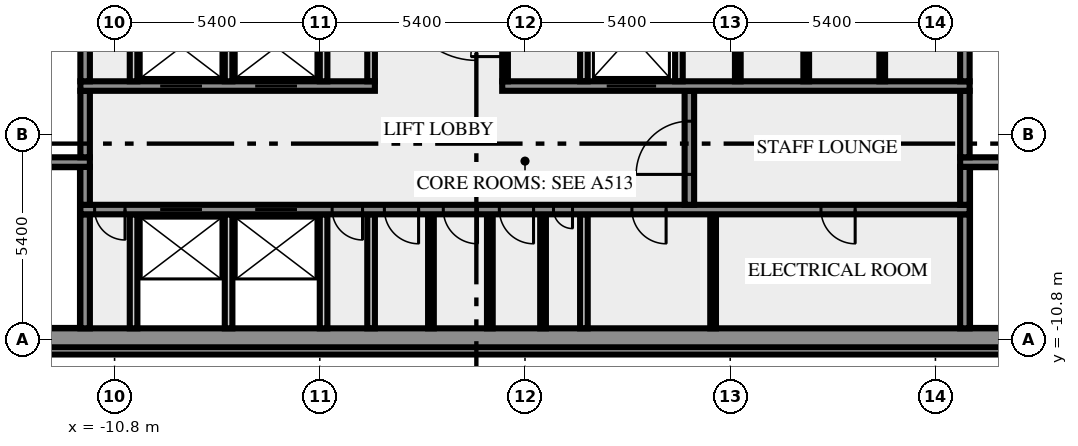
"""IFC4 building model, lengths in metres.
Left out: names, types, materials, properties, quantities, classifications, styles, units other than length and angle.
Written with IfcOpenShell. Run it as: python <this file> out.ifc"""

import sys

from ifc_helpers import new_model, si_unit, direction, frame, frame_2d, origin, place, context, subcontext, project, spatial, rectangle, extrude, element, fill, save


model = new_model("IFC4")
c1 = context("Model", 3, precision=1e-05, world=origin(), true_north=direction((0.0, 1.0)))
c2 = subcontext(c1, "Body", "Model", "MODEL_VIEW")
j1 = project(units=[si_unit("LENGTHUNIT", "METRE"), si_unit("PLANEANGLEUNIT", "RADIAN")], contexts=[c1])
p1 = place(None, origin())
s1 = spatial("IfcSite", under=j1, at=p1, CompositionType="ELEMENT")
p2 = place(p1, origin())
s2 = spatial("IfcBuilding", under=s1, at=p2, CompositionType="ELEMENT")
p3 = place(p2, frame((0.0, 0.0, 289.0)))
s3 = spatial("IfcBuildingStorey", under=s2, at=p3, CompositionType="ELEMENT", Elevation=289.0)
p4 = place(p3, frame((-17.444, -11.088, 0.0), z_axis=(0.0, 0.0, 1.0), x_axis=(1.0, 0.0, 0.0)))
e1 = element("IfcWall", 1, at=p4, inside=s3, PredefinedType="SOLIDWALL", context=c2, shape_type="SweptSolid", body=[
    extrude(rectangle(XDim=34.888, YDim=0.2, at=frame_2d((17.444, 0.0))), origin(), (0.0, 0.0, 1.0), 3.65),
])
p5 = place(p3, frame((-20.0, -10.75, 0.0), z_axis=(0.0, 0.0, 1.0), x_axis=(1.0, 0.0, 0.0)))
e2 = element("IfcWall", 2, at=p5, inside=s3, PredefinedType="SHEAR", context=c2, shape_type="SweptSolid", body=[
    extrude(rectangle(XDim=40.0, YDim=0.5, at=frame_2d((20.0, 0.0))), origin(), (0.0, 0.0, 1.0), 3.65),
])
p6 = place(p5, frame((0.8, 0.0, 1.0)))
e3 = element("IfcOpeningElement", 3, at=p6, cuts=e2, PredefinedType="OPENING", context=c2, shape_type="SweptSolid", body=[
    extrude(rectangle(XDim=1.2, YDim=1.2, at=frame_2d((0.6, 0.6))), frame((0.0, 0.26, 0.0), z_axis=(0.0, -1.0, 0.0), x_axis=(1.0, 0.0, 0.0)), (0.0, 0.0, 1.0), 0.52),
])
p7 = place(p5, frame((38.0, 0.0, 1.0)))
e4 = element("IfcOpeningElement", 4, at=p7, cuts=e2, PredefinedType="OPENING", context=c2, shape_type="SweptSolid", body=[
    extrude(rectangle(XDim=1.2, YDim=1.2, at=frame_2d((0.6, 0.6))), frame((0.0, 0.26, 0.0), z_axis=(0.0, -1.0, 0.0), x_axis=(1.0, 0.0, 0.0)), (0.0, 0.0, 1.0), 0.52),
])
p8 = place(p3, frame((-11.575, -10.5, 0.0), z_axis=(0.0, 0.0, 1.0), x_axis=(0.0, 1.0, 0.0)))
e5 = element("IfcWall", 5, at=p8, inside=s3, PredefinedType="SHEAR", context=c2, shape_type="SweptSolid", body=[
    extrude(rectangle(XDim=3.0, YDim=0.25, at=frame_2d((1.5, 0.0))), origin(), (0.0, 0.0, 1.0), 3.65),
])
for number, where, z_axis, x_axis in (
    (6, (-10.3, -10.5, 0.0), (0.0, 0.0, 1.0), (0.0, 1.0, 0.0)),
    (7, (-7.8, -10.5, 0.0), (0.0, 0.0, 1.0), (0.0, 1.0, 0.0)),
    (8, (-5.3, -10.5, 0.0), (0.0, 0.0, 1.0), (0.0, 1.0, 0.0)),
    (9, (-4.05, -10.5, 0.0), (0.0, 0.0, 1.0), (0.0, 1.0, 0.0)),
):
    element("IfcWall", number, at=place(p3, frame(where, z_axis=z_axis, x_axis=x_axis)), inside=s3, PredefinedType="SOLIDWALL", context=c2, shape_type="SweptSolid", body=[
        extrude(rectangle(XDim=3.0, YDim=0.2, at=frame_2d((1.5, 0.0))), origin(), (0.0, 0.0, 1.0), 3.65),
    ])
for number, where, z_axis, x_axis in (
    (10, (-2.475, -10.5, 0.0), (0.0, 0.0, 1.0), (0.0, 1.0, 0.0)),
    (11, (-0.925, -10.5, 0.0), (0.0, 0.0, 1.0), (0.0, 1.0, 0.0)),
    (12, (0.475, -10.5, 0.0), (0.0, 0.0, 1.0), (0.0, 1.0, 0.0)),
):
    element("IfcWall", number, at=place(p3, frame(where, z_axis=z_axis, x_axis=x_axis)), inside=s3, PredefinedType="PARTITIONING", context=c2, shape_type="SweptSolid", body=[
        extrude(rectangle(XDim=3.0, YDim=0.15, at=frame_2d((1.5, 0.0))), origin(), (0.0, 0.0, 1.0), 3.65),
    ])
p9 = place(p3, frame((1.55, -10.5, 0.0), z_axis=(0.0, 0.0, 1.0), x_axis=(0.0, 1.0, 0.0)))
e13 = element("IfcWall", 13, at=p9, inside=s3, PredefinedType="SOLIDWALL", context=c2, shape_type="SweptSolid", body=[
    extrude(rectangle(XDim=3.0, YDim=0.2, at=frame_2d((1.5, 0.0))), origin(), (0.0, 0.0, 1.0), 3.65),
])
p10 = place(p3, frame((4.95, -10.5, 0.0), z_axis=(0.0, 0.0, 1.0), x_axis=(0.0, 1.0, 0.0)))
e14 = element("IfcWall", 14, at=p10, inside=s3, PredefinedType="PARTITIONING", context=c2, shape_type="SweptSolid", body=[
    extrude(rectangle(XDim=3.0, YDim=0.15, at=frame_2d((1.5, 0.0))), origin(), (0.0, 0.0, 1.0), 3.65),
])
p11 = place(p3, frame((11.575, -10.5, 0.0), z_axis=(0.0, 0.0, 1.0), x_axis=(0.0, 1.0, 0.0)))
e15 = element("IfcWall", 15, at=p11, inside=s3, PredefinedType="SHEAR", context=c2, shape_type="SweptSolid", body=[
    extrude(rectangle(XDim=3.0, YDim=0.25, at=frame_2d((1.5, 0.0))), origin(), (0.0, 0.0, 1.0), 3.65),
])
p12 = place(p3, frame((11.7, -7.375, 0.0), z_axis=(0.0, 0.0, 1.0), x_axis=(-1.0, 0.0, 0.0)))
e16 = element("IfcWall", 16, at=p12, inside=s3, PredefinedType="SHEAR", context=c2, shape_type="SweptSolid", body=[
    extrude(rectangle(XDim=23.4, YDim=0.25, at=frame_2d((11.7, 0.0))), origin(), (0.0, 0.0, 1.0), 3.65),
])
p13 = place(p12, frame((22.225, 0.0, 0.0)))
e17 = element("IfcOpeningElement", 17, at=p13, cuts=e16, PredefinedType="OPENING", context=c2, shape_type="SweptSolid", body=[
    extrude(rectangle(XDim=0.8, YDim=2.1, at=frame_2d((0.4, 1.05))), frame((0.0, 0.135, 0.0), z_axis=(0.0, -1.0, 0.0), x_axis=(1.0, 0.0, 0.0)), (0.0, 0.0, 1.0), 0.27),
])
p14 = place(p12, frame((20.2, 0.0, 0.0)))
e18 = element("IfcOpeningElement", 18, at=p14, cuts=e16, PredefinedType="OPENING", context=c2, shape_type="SweptSolid", body=[
    extrude(rectangle(XDim=1.1, YDim=2.1, at=frame_2d((0.55, 1.05))), frame((0.0, 0.135, 0.0), z_axis=(0.0, -1.0, 0.0), x_axis=(1.0, 0.0, 0.0)), (0.0, 0.0, 1.0), 0.27),
])
p15 = place(p12, frame((17.7, 0.0, 0.0)))
e19 = element("IfcOpeningElement", 19, at=p15, cuts=e16, PredefinedType="OPENING", context=c2, shape_type="SweptSolid", body=[
    extrude(rectangle(XDim=1.1, YDim=2.1, at=frame_2d((0.55, 1.05))), frame((0.0, 0.135, 0.0), z_axis=(0.0, -1.0, 0.0), x_axis=(1.0, 0.0, 0.0)), (0.0, 0.0, 1.0), 0.27),
])
p16 = place(p12, frame((15.975, 0.0, 0.0)))
e20 = element("IfcOpeningElement", 20, at=p16, cuts=e16, PredefinedType="OPENING", context=c2, shape_type="SweptSolid", body=[
    extrude(rectangle(XDim=0.8, YDim=2.1, at=frame_2d((0.4, 1.05))), frame((0.0, 0.135, 0.0), z_axis=(0.0, -1.0, 0.0), x_axis=(1.0, 0.0, 0.0)), (0.0, 0.0, 1.0), 0.27),
])
p17 = place(p12, frame((14.5, 0.0, 0.0)))
e21 = element("IfcOpeningElement", 21, at=p17, cuts=e16, PredefinedType="OPENING", context=c2, shape_type="SweptSolid", body=[
    extrude(rectangle(XDim=0.9, YDim=2.1, at=frame_2d((0.45, 1.05))), frame((0.0, 0.135, 0.0), z_axis=(0.0, -1.0, 0.0), x_axis=(1.0, 0.0, 0.0)), (0.0, 0.0, 1.0), 0.27),
])
p18 = place(p12, frame((12.95, 0.0, 0.0)))
e22 = element("IfcOpeningElement", 22, at=p18, cuts=e16, PredefinedType="OPENING", context=c2, shape_type="SweptSolid", body=[
    extrude(rectangle(XDim=0.9, YDim=2.1, at=frame_2d((0.45, 1.05))), frame((0.0, 0.135, 0.0), z_axis=(0.0, -1.0, 0.0), x_axis=(1.0, 0.0, 0.0)), (0.0, 0.0, 1.0), 0.27),
])
p19 = place(p12, frame((11.475, 0.0, 0.0)))
e23 = element("IfcOpeningElement", 23, at=p19, cuts=e16, PredefinedType="OPENING", context=c2, shape_type="SweptSolid", body=[
    extrude(rectangle(XDim=0.9, YDim=2.1, at=frame_2d((0.45, 1.05))), frame((0.0, 0.135, 0.0), z_axis=(0.0, -1.0, 0.0), x_axis=(1.0, 0.0, 0.0)), (0.0, 0.0, 1.0), 0.27),
])
p20 = place(p12, frame((10.45, 0.0, 0.0)))
e24 = element("IfcOpeningElement", 24, at=p20, cuts=e16, PredefinedType="OPENING", context=c2, shape_type="SweptSolid", body=[
    extrude(rectangle(XDim=0.5, YDim=2.1, at=frame_2d((0.25, 1.05))), frame((0.0, 0.135, 0.0), z_axis=(0.0, -1.0, 0.0), x_axis=(1.0, 0.0, 0.0)), (0.0, 0.0, 1.0), 0.27),
])
p21 = place(p12, frame((7.987, 0.0, 0.0)))
e25 = element("IfcOpeningElement", 25, at=p21, cuts=e16, PredefinedType="OPENING", context=c2, shape_type="SweptSolid", body=[
    extrude(rectangle(XDim=0.9, YDim=2.1, at=frame_2d((0.45, 1.05))), frame((0.0, 0.135, 0.0), z_axis=(0.0, -1.0, 0.0), x_axis=(1.0, 0.0, 0.0)), (0.0, 0.0, 1.0), 0.27),
])
p22 = place(p12, frame((3.012, 0.0, 0.0)))
e26 = element("IfcOpeningElement", 26, at=p22, cuts=e16, PredefinedType="OPENING", context=c2, shape_type="SweptSolid", body=[
    extrude(rectangle(XDim=0.9, YDim=2.1, at=frame_2d((0.45, 1.05))), frame((0.0, 0.135, 0.0), z_axis=(0.0, -1.0, 0.0), x_axis=(1.0, 0.0, 0.0)), (0.0, 0.0, 1.0), 0.27),
])
p23 = place(p3, frame((-11.575, -7.25, 0.0), z_axis=(0.0, 0.0, 1.0), x_axis=(0.0, 1.0, 0.0)))
e27 = element("IfcWall", 27, at=p23, inside=s3, PredefinedType="SHEAR", context=c2, shape_type="SweptSolid", body=[
    extrude(rectangle(XDim=1.0, YDim=0.25, at=frame_2d((0.5, 0.0))), origin(), (0.0, 0.0, 1.0), 3.65),
])
p24 = place(p3, frame((4.325, -7.25, 0.0), z_axis=(0.0, 0.0, 1.0), x_axis=(0.0, 1.0, 0.0)))
e28 = element("IfcWall", 28, at=p24, inside=s3, PredefinedType="SHEAR", context=c2, shape_type="SweptSolid", body=[
    extrude(rectangle(XDim=3.0, YDim=0.25, at=frame_2d((1.5, 0.0))), origin(), (0.0, 0.0, 1.0), 3.65),
])
p25 = place(p24, frame((0.8, 0.0, 0.0)))
e29 = element("IfcOpeningElement", 29, at=p25, cuts=e28, PredefinedType="OPENING", context=c2, shape_type="SweptSolid", body=[
    extrude(rectangle(XDim=1.4, YDim=2.1, at=frame_2d((0.7, 1.05))), frame((0.0, 0.135, 0.0), z_axis=(0.0, -1.0, 0.0), x_axis=(1.0, 0.0, 0.0)), (0.0, 0.0, 1.0), 0.27),
])
p26 = place(p3, frame((11.575, -7.25, 0.0), z_axis=(0.0, 0.0, 1.0), x_axis=(0.0, 1.0, 0.0)))
e30 = element("IfcWall", 30, at=p26, inside=s3, PredefinedType="SHEAR", context=c2, shape_type="SweptSolid", body=[
    extrude(rectangle(XDim=1.0, YDim=0.25, at=frame_2d((0.5, 0.0))), origin(), (0.0, 0.0, 1.0), 3.65),
])
p27 = place(p3, frame((-11.45, -6.125, 0.0), z_axis=(0.0, 0.0, 1.0), x_axis=(-1.0, 0.0, 0.0)))
e31 = element("IfcWall", 31, at=p27, inside=s3, PredefinedType="SHEAR", context=c2, shape_type="SweptSolid", body=[
    extrude(rectangle(XDim=8.05, YDim=0.25, at=frame_2d((4.025, 0.0))), origin(), (0.0, 0.0, 1.0), 3.65),
])
p28 = place(p27, frame((6.2, 0.0, 0.0)))
e32 = element("IfcOpeningElement", 32, at=p28, cuts=e31, PredefinedType="OPENING", context=c2, shape_type="SweptSolid", body=[
    extrude(rectangle(XDim=1.8, YDim=2.1, at=frame_2d((0.9, 1.05))), frame((0.0, 0.135, 0.0), z_axis=(0.0, -1.0, 0.0), x_axis=(1.0, 0.0, 0.0)), (0.0, 0.0, 1.0), 0.27),
])
p29 = place(p3, frame((19.5, -6.125, 0.0), z_axis=(0.0, 0.0, 1.0), x_axis=(-1.0, 0.0, 0.0)))
e33 = element("IfcWall", 33, at=p29, inside=s3, PredefinedType="SHEAR", context=c2, shape_type="SweptSolid", body=[
    extrude(rectangle(XDim=8.05, YDim=0.25, at=frame_2d((4.025, 0.0))), origin(), (0.0, 0.0, 1.0), 3.65),
])
p30 = place(p29, frame((0.05, 0.0, 0.0)))
e34 = element("IfcOpeningElement", 34, at=p30, cuts=e33, PredefinedType="OPENING", context=c2, shape_type="SweptSolid", body=[
    extrude(rectangle(XDim=1.8, YDim=2.1, at=frame_2d((0.9, 1.05))), frame((0.0, 0.135, 0.0), z_axis=(0.0, -1.0, 0.0), x_axis=(1.0, 0.0, 0.0)), (0.0, 0.0, 1.0), 0.27),
])
for number, where, z_axis, x_axis in (
    (35, (-11.575, -6.0, 0.0), (0.0, 0.0, 1.0), (0.0, 1.0, 0.0)),
    (36, (11.575, -6.0, 0.0), (0.0, 0.0, 1.0), (0.0, 1.0, 0.0)),
):
    element("IfcWall", number, at=place(p3, frame(where, z_axis=z_axis, x_axis=x_axis)), inside=s3, PredefinedType="SHEAR", context=c2, shape_type="SweptSolid", body=[
        extrude(rectangle(XDim=1.75, YDim=0.25, at=frame_2d((0.875, 0.0))), origin(), (0.0, 0.0, 1.0), 3.65),
    ])
p31 = place(p3, frame((-11.7, -4.125, 0.0), z_axis=(0.0, 0.0, 1.0), x_axis=(1.0, 0.0, 0.0)))
e37 = element("IfcWall", 37, at=p31, inside=s3, PredefinedType="SHEAR", context=c2, shape_type="SweptSolid", body=[
    extrude(rectangle(XDim=7.75, YDim=0.25, at=frame_2d((3.875, 0.0))), origin(), (0.0, 0.0, 1.0), 3.65),
])
p32 = place(p31, frame((2.1, 0.0, 0.0)))
e38 = element("IfcOpeningElement", 38, at=p32, cuts=e37, PredefinedType="OPENING", context=c2, shape_type="SweptSolid", body=[
    extrude(rectangle(XDim=1.1, YDim=2.1, at=frame_2d((0.55, 1.05))), frame((0.0, 0.135, 0.0), z_axis=(0.0, -1.0, 0.0), x_axis=(1.0, 0.0, 0.0)), (0.0, 0.0, 1.0), 0.27),
])
p33 = place(p31, frame((4.6, 0.0, 0.0)))
e39 = element("IfcOpeningElement", 39, at=p33, cuts=e37, PredefinedType="OPENING", context=c2, shape_type="SweptSolid", body=[
    extrude(rectangle(XDim=1.1, YDim=2.1, at=frame_2d((0.55, 1.05))), frame((0.0, 0.135, 0.0), z_axis=(0.0, -1.0, 0.0), x_axis=(1.0, 0.0, 0.0)), (0.0, 0.0, 1.0), 0.27),
])
p34 = place(p3, frame((-0.6, -4.125, 0.0), z_axis=(0.0, 0.0, 1.0), x_axis=(1.0, 0.0, 0.0)))
e40 = element("IfcWall", 40, at=p34, inside=s3, PredefinedType="SHEAR", context=c2, shape_type="SweptSolid", body=[
    extrude(rectangle(XDim=12.3, YDim=0.25, at=frame_2d((6.15, 0.0))), origin(), (0.0, 0.0, 1.0), 3.65),
])
p35 = place(p34, frame((2.75, 0.0, 0.0)))
e41 = element("IfcOpeningElement", 41, at=p35, cuts=e40, PredefinedType="OPENING", context=c2, shape_type="SweptSolid", body=[
    extrude(rectangle(XDim=1.3, YDim=2.1, at=frame_2d((0.65, 1.05))), frame((0.0, 0.135, 0.0), z_axis=(0.0, -1.0, 0.0), x_axis=(1.0, 0.0, 0.0)), (0.0, 0.0, 1.0), 0.27),
])
p36 = place(p3, frame((-11.575, -4.0, 0.0), z_axis=(0.0, 0.0, 1.0), x_axis=(0.0, 1.0, 0.0)))
e42 = element("IfcWall", 42, at=p36, inside=s3, PredefinedType="SHEAR", context=c2, shape_type="SweptSolid", body=[
    extrude(rectangle(XDim=2.3, YDim=0.25, at=frame_2d((1.15, 0.0))), origin(), (0.0, 0.0, 1.0), 3.65),
])
for number, where, z_axis, x_axis in (
    (43, (-10.3, -4.0, 0.0), (0.0, 0.0, 1.0), (0.0, 1.0, 0.0)),
    (44, (-7.8, -4.0, 0.0), (0.0, 0.0, 1.0), (0.0, 1.0, 0.0)),
    (45, (-5.3, -4.0, 0.0), (0.0, 0.0, 1.0), (0.0, 1.0, 0.0)),
    (46, (-4.05, -4.0, 0.0), (0.0, 0.0, 1.0), (0.0, 1.0, 0.0)),
):
    element("IfcWall", number, at=place(p3, frame(where, z_axis=z_axis, x_axis=x_axis)), inside=s3, PredefinedType="SOLIDWALL", context=c2, shape_type="SweptSolid", body=[
        extrude(rectangle(XDim=2.3, YDim=0.2, at=frame_2d((1.15, 0.0))), origin(), (0.0, 0.0, 1.0), 3.65),
    ])
p37 = place(p3, frame((-0.525, -4.0, 0.0), z_axis=(0.0, 0.0, 1.0), x_axis=(0.0, 1.0, 0.0)))
e47 = element("IfcWall", 47, at=p37, inside=s3, PredefinedType="PARTITIONING", context=c2, shape_type="SweptSolid", body=[
    extrude(rectangle(XDim=2.3, YDim=0.15, at=frame_2d((1.15, 0.0))), origin(), (0.0, 0.0, 1.0), 3.65),
])
p38 = place(p37, frame((0.65, 0.0, 0.0)))
e48 = element("IfcOpeningElement", 48, at=p38, cuts=e47, PredefinedType="OPENING", context=c2, shape_type="SweptSolid", body=[
    extrude(rectangle(XDim=0.9, YDim=2.1, at=frame_2d((0.45, 1.05))), frame((0.0, 0.085, 0.0), z_axis=(0.0, -1.0, 0.0), x_axis=(1.0, 0.0, 0.0)), (0.0, 0.0, 1.0), 0.17),
])
for number, where, z_axis, x_axis in (
    (49, (1.55, -4.0, 0.0), (0.0, 0.0, 1.0), (0.0, 1.0, 0.0)),
    (50, (4.05, -4.0, 0.0), (0.0, 0.0, 1.0), (0.0, 1.0, 0.0)),
):
    element("IfcWall", number, at=place(p3, frame(where, z_axis=z_axis, x_axis=x_axis)), inside=s3, PredefinedType="SOLIDWALL", context=c2, shape_type="SweptSolid", body=[
        extrude(rectangle(XDim=2.3, YDim=0.2, at=frame_2d((1.15, 0.0))), origin(), (0.0, 0.0, 1.0), 3.65),
    ])
for number, where, z_axis, x_axis in (
    (51, (5.6, -4.0, 0.0), (0.0, 0.0, 1.0), (0.0, 1.0, 0.0)),
    (52, (7.4, -4.0, 0.0), (0.0, 0.0, 1.0), (0.0, 1.0, 0.0)),
    (53, (9.4, -4.0, 0.0), (0.0, 0.0, 1.0), (0.0, 1.0, 0.0)),
):
    element("IfcWall", number, at=place(p3, frame(where, z_axis=z_axis, x_axis=x_axis)), inside=s3, PredefinedType="PARTITIONING", context=c2, shape_type="SweptSolid", body=[
        extrude(rectangle(XDim=2.3, YDim=0.15, at=frame_2d((1.15, 0.0))), origin(), (0.0, 0.0, 1.0), 3.65),
    ])
p39 = place(p3, frame((11.575, -4.0, 0.0), z_axis=(0.0, 0.0, 1.0), x_axis=(0.0, 1.0, 0.0)))
e54 = element("IfcWall", 54, at=p39, inside=s3, PredefinedType="SHEAR", context=c2, shape_type="SweptSolid", body=[
    extrude(rectangle(XDim=2.3, YDim=0.25, at=frame_2d((1.15, 0.0))), origin(), (0.0, 0.0, 1.0), 3.65),
])
p40 = place(p13, origin())
e55 = element("IfcDoor", 55, at=p40, inside=s3, OperationType="SINGLE_SWING_RIGHT", PredefinedType="DOOR", context=c2, shape_type="SweptSolid", body=[
    extrude(rectangle(XDim=0.8, YDim=2.1, at=frame_2d((0.4, 1.05))), frame((0.0, 0.025, 0.0), z_axis=(0.0, -1.0, 0.0), x_axis=(1.0, 0.0, 0.0)), (0.0, 0.0, 1.0), 0.05),
])
fill(e17, e55)
p41 = place(p14, origin())
e56 = element("IfcDoor", 56, at=p41, inside=s3, OperationType="DOUBLE_DOOR_SLIDING", PredefinedType="DOOR", context=c2, shape_type="SweptSolid", body=[
    extrude(rectangle(XDim=1.1, YDim=2.1, at=frame_2d((0.55, 1.05))), frame((0.0, 0.025, 0.0), z_axis=(0.0, -1.0, 0.0), x_axis=(1.0, 0.0, 0.0)), (0.0, 0.0, 1.0), 0.05),
])
fill(e18, e56)
p42 = place(p15, origin())
e57 = element("IfcDoor", 57, at=p42, inside=s3, OperationType="DOUBLE_DOOR_SLIDING", PredefinedType="DOOR", context=c2, shape_type="SweptSolid", body=[
    extrude(rectangle(XDim=1.1, YDim=2.1, at=frame_2d((0.55, 1.05))), frame((0.0, 0.025, 0.0), z_axis=(0.0, -1.0, 0.0), x_axis=(1.0, 0.0, 0.0)), (0.0, 0.0, 1.0), 0.05),
])
fill(e19, e57)
p43 = place(p16, origin())
e58 = element("IfcDoor", 58, at=p43, inside=s3, OperationType="SINGLE_SWING_RIGHT", PredefinedType="DOOR", context=c2, shape_type="SweptSolid", body=[
    extrude(rectangle(XDim=0.8, YDim=2.1, at=frame_2d((0.4, 1.05))), frame((0.0, 0.025, 0.0), z_axis=(0.0, -1.0, 0.0), x_axis=(1.0, 0.0, 0.0)), (0.0, 0.0, 1.0), 0.05),
])
fill(e20, e58)
p44 = place(p17, origin())
e59 = element("IfcDoor", 59, at=p44, inside=s3, OperationType="SINGLE_SWING_RIGHT", PredefinedType="DOOR", context=c2, shape_type="SweptSolid", body=[
    extrude(rectangle(XDim=0.9, YDim=2.1, at=frame_2d((0.45, 1.05))), frame((0.0, 0.025, 0.0), z_axis=(0.0, -1.0, 0.0), x_axis=(1.0, 0.0, 0.0)), (0.0, 0.0, 1.0), 0.05),
])
fill(e21, e59)
p45 = place(p18, origin())
e60 = element("IfcDoor", 60, at=p45, inside=s3, OperationType="SINGLE_SWING_RIGHT", PredefinedType="DOOR", context=c2, shape_type="SweptSolid", body=[
    extrude(rectangle(XDim=0.9, YDim=2.1, at=frame_2d((0.45, 1.05))), frame((0.0, 0.025, 0.0), z_axis=(0.0, -1.0, 0.0), x_axis=(1.0, 0.0, 0.0)), (0.0, 0.0, 1.0), 0.05),
])
fill(e22, e60)
p46 = place(p19, origin())
e61 = element("IfcDoor", 61, at=p46, inside=s3, OperationType="SINGLE_SWING_RIGHT", PredefinedType="DOOR", context=c2, shape_type="SweptSolid", body=[
    extrude(rectangle(XDim=0.9, YDim=2.1, at=frame_2d((0.45, 1.05))), frame((0.0, 0.025, 0.0), z_axis=(0.0, -1.0, 0.0), x_axis=(1.0, 0.0, 0.0)), (0.0, 0.0, 1.0), 0.05),
])
fill(e23, e61)
p47 = place(p20, origin())
e62 = element("IfcDoor", 62, at=p47, inside=s3, OperationType="SINGLE_SWING_LEFT", PredefinedType="DOOR", context=c2, shape_type="SweptSolid", body=[
    extrude(rectangle(XDim=0.5, YDim=2.1, at=frame_2d((0.25, 1.05))), frame((0.0, 0.025, 0.0), z_axis=(0.0, -1.0, 0.0), x_axis=(1.0, 0.0, 0.0)), (0.0, 0.0, 1.0), 0.05),
])
fill(e24, e62)
p48 = place(p21, origin())
e63 = element("IfcDoor", 63, at=p48, inside=s3, OperationType="SINGLE_SWING_LEFT", PredefinedType="DOOR", context=c2, shape_type="SweptSolid", body=[
    extrude(rectangle(XDim=0.9, YDim=2.1, at=frame_2d((0.45, 1.05))), frame((0.0, 0.025, 0.0), z_axis=(0.0, -1.0, 0.0), x_axis=(1.0, 0.0, 0.0)), (0.0, 0.0, 1.0), 0.05),
])
fill(e25, e63)
p49 = place(p22, origin())
e64 = element("IfcDoor", 64, at=p49, inside=s3, OperationType="SINGLE_SWING_LEFT", PredefinedType="DOOR", context=c2, shape_type="SweptSolid", body=[
    extrude(rectangle(XDim=0.9, YDim=2.1, at=frame_2d((0.45, 1.05))), frame((0.0, 0.025, 0.0), z_axis=(0.0, -1.0, 0.0), x_axis=(1.0, 0.0, 0.0)), (0.0, 0.0, 1.0), 0.05),
])
fill(e26, e64)
p50 = place(p25, origin())
e65 = element("IfcDoor", 65, at=p50, inside=s3, OperationType="DOUBLE_DOOR_SINGLE_SWING", PredefinedType="DOOR", context=c2, shape_type="SweptSolid", body=[
    extrude(rectangle(XDim=1.4, YDim=2.1, at=frame_2d((0.7, 1.05))), frame((0.0, 0.025, 0.0), z_axis=(0.0, -1.0, 0.0), x_axis=(1.0, 0.0, 0.0)), (0.0, 0.0, 1.0), 0.05),
])
fill(e29, e65)
p51 = place(p32, origin())
e66 = element("IfcDoor", 66, at=p51, inside=s3, OperationType="DOUBLE_DOOR_SLIDING", PredefinedType="DOOR", context=c2, shape_type="SweptSolid", body=[
    extrude(rectangle(XDim=1.1, YDim=2.1, at=frame_2d((0.55, 1.05))), frame((0.0, 0.025, 0.0), z_axis=(0.0, -1.0, 0.0), x_axis=(1.0, 0.0, 0.0)), (0.0, 0.0, 1.0), 0.05),
])
fill(e38, e66)
p52 = place(p33, origin())
e67 = element("IfcDoor", 67, at=p52, inside=s3, OperationType="DOUBLE_DOOR_SLIDING", PredefinedType="DOOR", context=c2, shape_type="SweptSolid", body=[
    extrude(rectangle(XDim=1.1, YDim=2.1, at=frame_2d((0.55, 1.05))), frame((0.0, 0.025, 0.0), z_axis=(0.0, -1.0, 0.0), x_axis=(1.0, 0.0, 0.0)), (0.0, 0.0, 1.0), 0.05),
])
fill(e39, e67)
p53 = place(p35, origin())
e68 = element("IfcDoor", 68, at=p53, inside=s3, OperationType="DOUBLE_DOOR_SLIDING", PredefinedType="DOOR", context=c2, shape_type="SweptSolid", body=[
    extrude(rectangle(XDim=1.3, YDim=2.1, at=frame_2d((0.65, 1.05))), frame((0.0, 0.025, 0.0), z_axis=(0.0, -1.0, 0.0), x_axis=(1.0, 0.0, 0.0)), (0.0, 0.0, 1.0), 0.05),
])
fill(e41, e68)
p54 = place(p38, origin())
e69 = element("IfcDoor", 69, at=p54, inside=s3, OperationType="SINGLE_SWING_LEFT", PredefinedType="DOOR", context=c2, shape_type="SweptSolid", body=[
    extrude(rectangle(XDim=0.9, YDim=2.1, at=frame_2d((0.45, 1.05))), frame((0.0, 0.025, 0.0), z_axis=(0.0, -1.0, 0.0), x_axis=(1.0, 0.0, 0.0)), (0.0, 0.0, 1.0), 0.05),
])
fill(e48, e69)
save(model, sys.argv[1])
